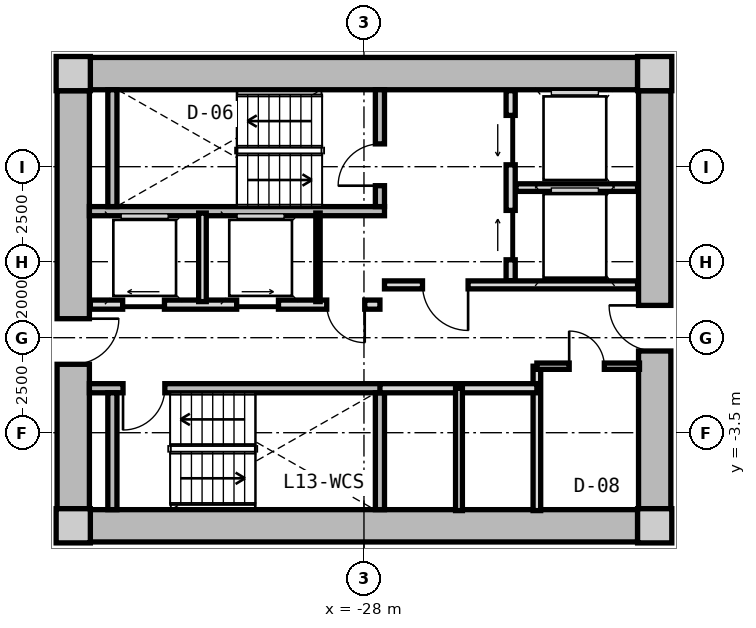
"""IFC4 building model, lengths in metres.
Left out: names, types, materials, properties, quantities, classifications, styles, units other than length and angle.
Written with IfcOpenShell. Run it as: python <this file> out.ifc"""

import sys

from ifc_helpers import new_model, si_unit, direction, frame, frame_2d, origin, origin_2d, place, context, subcontext, project, spatial, rectangle, extrude, source, transform, mapped, element, fill, save


model = new_model("IFC4")
c1 = context("Model", 3, precision=1e-05, world=origin(), true_north=direction((0.0, 1.0)))
c2 = subcontext(c1, "Body", "Model", "MODEL_VIEW")
j1 = project(units=[si_unit("LENGTHUNIT", "METRE"), si_unit("PLANEANGLEUNIT", "RADIAN")], contexts=[c1])
p1 = place(None, origin())
s1 = spatial("IfcSite", under=j1, at=p1, CompositionType="ELEMENT")
p2 = place(p1, origin())
s2 = spatial("IfcBuilding", under=s1, at=p2, CompositionType="ELEMENT")
p3 = place(p2, frame((0.0, 0.0, 46.0)))
s3 = spatial("IfcBuildingStorey", under=s2, at=p3, CompositionType="ELEMENT", Elevation=46.0)
m1 = source(origin(), c2, "Body", "SweptSolid", [
    extrude(rectangle(XDim=0.9, YDim=0.9, at=origin_2d()), origin(), (0.0, 0.0, 1.0), 3.05),
])
for number, where, z_axis, x_axis in (
    (1, (-35.65, -5.95, 0.0), (0.0, 0.0, 1.0), (1.0, 0.0, 0.0)),
    (2, (-20.35, -5.95, 0.0), (0.0, 0.0, 1.0), (1.0, 0.0, 0.0)),
    (3, (-20.35, 5.95, 0.0), (0.0, 0.0, 1.0), (1.0, 0.0, 0.0)),
    (4, (-35.65, 5.95, 0.0), (0.0, 0.0, 1.0), (1.0, 0.0, 0.0)),
):
    element("IfcColumn", number, at=place(p3, frame(where, z_axis=z_axis, x_axis=x_axis)), inside=s3, PredefinedType="COLUMN", context=c2, shape_type="MappedRepresentation", body=[
        mapped(m1, transform((0.0, 0.0, 0.0), x_axis=(1.0, 0.0, 0.0), y_axis=(0.0, 1.0, 0.0), z_axis=(0.0, 0.0, 1.0), scale=1.0)),
    ])
m2 = source(origin(), c2, "Body", "SweptSolid", [
    extrude(rectangle(XDim=14.4, YDim=0.85, at=frame_2d((7.2, 0.0))), origin(), (0.0, 0.0, 1.0), 2.79),
])
for number, where, z_axis, x_axis in (
    (5, (-35.2, 5.95, 0.0), (0.0, 0.0, 1.0), (1.0, 0.0, 0.0)),
    (6, (-20.8, -5.95, 0.0), (0.0, 0.0, 1.0), (-1.0, 0.0, 0.0)),
):
    element("IfcWall", number, at=place(p3, frame(where, z_axis=z_axis, x_axis=x_axis)), inside=s3, PredefinedType="SHEAR", context=c2, shape_type="MappedRepresentation", body=[
        mapped(m2, transform((0.0, 0.0, 0.0), x_axis=(1.0, 0.0, 0.0), y_axis=(0.0, 1.0, 0.0), z_axis=(0.0, 0.0, 1.0), scale=1.0)),
    ])
m3 = source(origin(), c2, "Body", "SweptSolid", [
    extrude(rectangle(XDim=11.0, YDim=0.85, at=frame_2d((5.5, 0.0))), origin(), (0.0, 0.0, 1.0), 2.79),
])
p4 = place(p3, frame((-35.65, -5.5, 0.0), z_axis=(0.0, 0.0, 1.0), x_axis=(0.0, 1.0, 0.0)))
e7 = element("IfcWall", 7, at=p4, inside=s3, PredefinedType="SHEAR", context=c2, shape_type="MappedRepresentation", body=[
    mapped(m3, transform((0.0, 0.0, 0.0), x_axis=(1.0, 0.0, 0.0), y_axis=(0.0, 1.0, 0.0), z_axis=(0.0, 0.0, 1.0), scale=1.0)),
])
p5 = place(p4, frame((3.8, 0.0, 0.0)))
e8 = element("IfcOpeningElement", 8, at=p5, cuts=e7, PredefinedType="OPENING", context=c2, shape_type="SweptSolid", body=[
    extrude(rectangle(XDim=1.2, YDim=2.15, at=frame_2d((0.6, 1.075))), frame((0.0, 0.435, 0.0), z_axis=(0.0, -1.0, 0.0), x_axis=(1.0, 0.0, 0.0)), (0.0, 0.0, 1.0), 0.87),
])
p6 = place(p3, frame((-20.35, 5.5, 0.0), z_axis=(0.0, 0.0, 1.0), x_axis=(0.0, -1.0, 0.0)))
e9 = element("IfcWall", 9, at=p6, inside=s3, PredefinedType="SHEAR", context=c2, shape_type="MappedRepresentation", body=[
    mapped(m3, transform((0.0, 0.0, 0.0), x_axis=(1.0, 0.0, 0.0), y_axis=(0.0, 1.0, 0.0), z_axis=(0.0, 0.0, 1.0), scale=1.0)),
])
p7 = place(p6, frame((5.65, 0.0, 0.0)))
e10 = element("IfcOpeningElement", 10, at=p7, cuts=e9, PredefinedType="OPENING", context=c2, shape_type="SweptSolid", body=[
    extrude(rectangle(XDim=1.2, YDim=2.15, at=frame_2d((0.6, 1.075))), frame((0.0, 0.435, 0.0), z_axis=(0.0, -1.0, 0.0), x_axis=(1.0, 0.0, 0.0)), (0.0, 0.0, 1.0), 0.87),
])
m4 = source(origin(), c2, "Body", "SweptSolid", [
    extrude(rectangle(XDim=7.765, YDim=0.24, at=frame_2d((3.883, 0.0))), origin(), (0.0, 0.0, 1.0), 2.79),
])
p8 = place(p3, frame((-35.225, 2.33, 0.0), z_axis=(0.0, 0.0, 1.0), x_axis=(1.0, 0.0, 0.0)))
e11 = element("IfcWall", 11, at=p8, inside=s3, PredefinedType="PARTITIONING", context=c2, shape_type="MappedRepresentation", body=[
    mapped(m4, transform((0.0, 0.0, 0.0), x_axis=(1.0, 0.0, 0.0), y_axis=(0.0, 1.0, 0.0), z_axis=(0.0, 0.0, 1.0), scale=1.0)),
])
m5 = source(origin(), c2, "Body", "SweptSolid", [
    extrude(rectangle(XDim=3.075, YDim=0.24, at=frame_2d((1.538, 0.0))), origin(), (0.0, 0.0, 1.0), 2.79),
])
p9 = place(p3, frame((-34.62, 2.45, 0.0), z_axis=(0.0, 0.0, 1.0), x_axis=(0.0, 1.0, 0.0)))
e12 = element("IfcWall", 12, at=p9, inside=s3, PredefinedType="PARTITIONING", context=c2, shape_type="MappedRepresentation", body=[
    mapped(m5, transform((0.0, 0.0, 0.0), x_axis=(1.0, 0.0, 0.0), y_axis=(0.0, 1.0, 0.0), z_axis=(0.0, 0.0, 1.0), scale=1.0)),
])
p10 = place(p3, frame((-27.58, 2.45, 0.0), z_axis=(0.0, 0.0, 1.0), x_axis=(0.0, 1.0, 0.0)))
e13 = element("IfcWall", 13, at=p10, inside=s3, PredefinedType="PARTITIONING", context=c2, shape_type="MappedRepresentation", body=[
    mapped(m5, transform((0.0, 0.0, 0.0), x_axis=(1.0, 0.0, 0.0), y_axis=(0.0, 1.0, 0.0), z_axis=(0.0, 0.0, 1.0), scale=1.0)),
])
p11 = place(p10, frame((0.55, 0.0, 0.0)))
e14 = element("IfcOpeningElement", 14, at=p11, cuts=e13, PredefinedType="OPENING", context=c2, shape_type="SweptSolid", body=[
    extrude(rectangle(XDim=1.1, YDim=2.15, at=frame_2d((0.55, 1.075))), frame((0.0, 0.13, 0.0), z_axis=(0.0, -1.0, 0.0), x_axis=(1.0, 0.0, 0.0)), (0.0, 0.0, 1.0), 0.26),
])
p12 = place(p3, frame((-35.225, -2.33, 0.0), z_axis=(0.0, 0.0, 1.0), x_axis=(1.0, 0.0, 0.0)))
e15 = element("IfcWall", 15, at=p12, inside=s3, PredefinedType="PARTITIONING", context=c2, shape_type="MappedRepresentation", body=[
    mapped(m4, transform((0.0, 0.0, 0.0), x_axis=(1.0, 0.0, 0.0), y_axis=(0.0, 1.0, 0.0), z_axis=(0.0, 0.0, 1.0), scale=1.0)),
])
p13 = place(p12, frame((0.885, 0.0, 0.0)))
e16 = element("IfcOpeningElement", 16, at=p13, cuts=e15, PredefinedType="OPENING", context=c2, shape_type="SweptSolid", body=[
    extrude(rectangle(XDim=1.1, YDim=2.15, at=frame_2d((0.55, 1.075))), frame((0.0, 0.13, 0.0), z_axis=(0.0, -1.0, 0.0), x_axis=(1.0, 0.0, 0.0)), (0.0, 0.0, 1.0), 0.26),
])
for number, where, z_axis, x_axis in (
    (17, (-34.62, -5.525, 0.0), (0.0, 0.0, 1.0), (0.0, 1.0, 0.0)),
    (18, (-27.58, -5.525, 0.0), (0.0, 0.0, 1.0), (0.0, 1.0, 0.0)),
):
    element("IfcWall", number, at=place(p3, frame(where, z_axis=z_axis, x_axis=x_axis)), inside=s3, PredefinedType="PARTITIONING", context=c2, shape_type="MappedRepresentation", body=[
        mapped(m5, transform((0.0, 0.0, 0.0), x_axis=(1.0, 0.0, 0.0), y_axis=(0.0, 1.0, 0.0), z_axis=(0.0, 0.0, 1.0), scale=1.0)),
    ])
m6 = source(origin(), c2, "Body", "SweptSolid", [
    extrude(rectangle(XDim=5.0, YDim=0.24, at=frame_2d((2.5, 0.0))), origin(), (0.0, 0.0, 1.0), 2.775),
])
p14 = place(p3, frame((-24.14, 0.5, 0.0), z_axis=(0.0, 0.0, 1.0), x_axis=(0.0, 1.0, 0.0)))
e19 = element("IfcWall", 19, at=p14, inside=s3, PredefinedType="PARTITIONING", context=c2, shape_type="MappedRepresentation", body=[
    mapped(m6, transform((0.0, 0.0, 0.0), x_axis=(1.0, 0.0, 0.0), y_axis=(0.0, 1.0, 0.0), z_axis=(0.0, 0.0, 1.0), scale=1.0)),
])
p15 = place(p14, frame((3.05, 0.0, 0.0)))
e20 = element("IfcOpeningElement", 20, at=p15, cuts=e19, PredefinedType="OPENING", context=c2, shape_type="SweptSolid", body=[
    extrude(rectangle(XDim=1.3, YDim=2.2, at=frame_2d((0.65, 1.1))), frame((0.0, 0.13, 0.0), z_axis=(0.0, -1.0, 0.0), x_axis=(1.0, 0.0, 0.0)), (0.0, 0.0, 1.0), 0.26),
])
p16 = place(p14, frame((0.55, 0.0, 0.0)))
e21 = element("IfcOpeningElement", 21, at=p16, cuts=e19, PredefinedType="OPENING", context=c2, shape_type="SweptSolid", body=[
    extrude(rectangle(XDim=1.3, YDim=2.2, at=frame_2d((0.65, 1.1))), frame((0.0, 0.13, 0.0), z_axis=(0.0, -1.0, 0.0), x_axis=(1.0, 0.0, 0.0)), (0.0, 0.0, 1.0), 0.26),
])
m7 = source(origin(), c2, "Body", "SweptSolid", [
    extrude(rectangle(XDim=3.2, YDim=0.2, at=frame_2d((1.6, 0.0))), origin(), (0.0, 0.0, 1.0), 2.775),
])
p17 = place(p3, frame((-24.0, 2.95, 0.0), z_axis=(0.0, 0.0, 1.0), x_axis=(1.0, 0.0, 0.0)))
e22 = element("IfcWall", 22, at=p17, inside=s3, PredefinedType="PARTITIONING", context=c2, shape_type="MappedRepresentation", body=[
    mapped(m7, transform((0.0, 0.0, 0.0), x_axis=(1.0, 0.0, 0.0), y_axis=(0.0, 1.0, 0.0), z_axis=(0.0, 0.0, 1.0), scale=1.0)),
])
m8 = source(origin(), c2, "Body", "SweptSolid", [
    extrude(rectangle(XDim=6.66, YDim=0.21, at=frame_2d((3.33, 0.0))), origin(), (0.0, 0.0, 1.0), 2.775),
])
p18 = place(p3, frame((-27.46, 0.39, 0.0), z_axis=(0.0, 0.0, 1.0), x_axis=(1.0, 0.0, 0.0)))
e23 = element("IfcWall", 23, at=p18, inside=s3, PredefinedType="PARTITIONING", context=c2, shape_type="MappedRepresentation", body=[
    mapped(m8, transform((0.0, 0.0, 0.0), x_axis=(1.0, 0.0, 0.0), y_axis=(0.0, 1.0, 0.0), z_axis=(0.0, 0.0, 1.0), scale=1.0)),
])
p19 = place(p18, frame((1.0, 0.0, 0.0)))
e24 = element("IfcOpeningElement", 24, at=p19, cuts=e23, PredefinedType="OPENING", context=c2, shape_type="SweptSolid", body=[
    extrude(rectangle(XDim=1.2, YDim=2.15, at=frame_2d((0.6, 1.075))), frame((0.0, 0.115, 0.0), z_axis=(0.0, -1.0, 0.0), x_axis=(1.0, 0.0, 0.0)), (0.0, 0.0, 1.0), 0.23),
])
m9 = source(origin(), c2, "Body", "SweptSolid", [
    extrude(rectangle(XDim=7.62, YDim=0.24, at=frame_2d((3.81, 0.0))), origin(), (0.0, 0.0, 1.0), 2.775),
])
p20 = place(p3, frame((-35.2, -0.13, 0.0), z_axis=(0.0, 0.0, 1.0), x_axis=(1.0, 0.0, 0.0)))
e25 = element("IfcWall", 25, at=p20, inside=s3, PredefinedType="PARTITIONING", context=c2, shape_type="MappedRepresentation", body=[
    mapped(m9, transform((0.0, 0.0, 0.0), x_axis=(1.0, 0.0, 0.0), y_axis=(0.0, 1.0, 0.0), z_axis=(0.0, 0.0, 1.0), scale=1.0)),
])
p21 = place(p20, frame((6.22, 0.0, 0.0)))
e26 = element("IfcOpeningElement", 26, at=p21, cuts=e25, PredefinedType="OPENING", context=c2, shape_type="SweptSolid", body=[
    extrude(rectangle(XDim=1.0, YDim=2.1, at=frame_2d((0.5, 1.05))), frame((0.0, 0.13, 0.0), z_axis=(0.0, -1.0, 0.0), x_axis=(1.0, 0.0, 0.0)), (0.0, 0.0, 1.0), 0.26),
])
p22 = place(p20, frame((0.85, 0.0, 0.0)))
e27 = element("IfcOpeningElement", 27, at=p22, cuts=e25, PredefinedType="OPENING", context=c2, shape_type="SweptSolid", body=[
    extrude(rectangle(XDim=1.1, YDim=2.2, at=frame_2d((0.55, 1.1))), frame((0.0, 0.13, 0.0), z_axis=(0.0, -1.0, 0.0), x_axis=(1.0, 0.0, 0.0)), (0.0, 0.0, 1.0), 0.26),
])
p23 = place(p20, frame((3.85, 0.0, 0.0)))
e28 = element("IfcOpeningElement", 28, at=p23, cuts=e25, PredefinedType="OPENING", context=c2, shape_type="SweptSolid", body=[
    extrude(rectangle(XDim=1.1, YDim=2.2, at=frame_2d((0.55, 1.1))), frame((0.0, 0.13, 0.0), z_axis=(0.0, -1.0, 0.0), x_axis=(1.0, 0.0, 0.0)), (0.0, 0.0, 1.0), 0.26),
])
m10 = source(origin(), c2, "Body", "SweptSolid", [
    extrude(rectangle(XDim=2.33, YDim=0.115, at=frame_2d((1.165, 0.0))), origin(), (0.0, 0.0, 1.0), 2.775),
])
p24 = place(p3, frame((-29.21, -0.05, 0.0), z_axis=(0.0, 0.0, 1.0), x_axis=(0.0, 1.0, 0.0)))
e29 = element("IfcWall", 29, at=p24, inside=s3, PredefinedType="PARTITIONING", context=c2, shape_type="MappedRepresentation", body=[
    mapped(m10, transform((0.0, 0.0, 0.0), x_axis=(1.0, 0.0, 0.0), y_axis=(0.0, 1.0, 0.0), z_axis=(0.0, 0.0, 1.0), scale=1.0)),
])
m11 = source(origin(), c2, "Body", "SweptSolid", [
    extrude(rectangle(XDim=2.33, YDim=0.2, at=frame_2d((1.165, 0.0))), origin(), (0.0, 0.0, 1.0), 2.775),
])
p25 = place(p3, frame((-32.25, -0.05, 0.0), z_axis=(0.0, 0.0, 1.0), x_axis=(0.0, 1.0, 0.0)))
e30 = element("IfcWall", 30, at=p25, inside=s3, PredefinedType="PARTITIONING", context=c2, shape_type="MappedRepresentation", body=[
    mapped(m11, transform((0.0, 0.0, 0.0), x_axis=(1.0, 0.0, 0.0), y_axis=(0.0, 1.0, 0.0), z_axis=(0.0, 0.0, 1.0), scale=1.0)),
])
m12 = source(origin(), c2, "Body", "SweptSolid", [
    extrude(rectangle(XDim=3.8, YDim=0.2, at=frame_2d((1.9, 0.0))), origin(), (0.0, 0.0, 1.0), 2.775),
])
p26 = place(p3, frame((-23.45, -5.55, 0.0), z_axis=(0.0, 0.0, 1.0), x_axis=(0.0, 1.0, 0.0)))
e31 = element("IfcWall", 31, at=p26, inside=s3, PredefinedType="PARTITIONING", context=c2, shape_type="MappedRepresentation", body=[
    mapped(m12, transform((0.0, 0.0, 0.0), x_axis=(1.0, 0.0, 0.0), y_axis=(0.0, 1.0, 0.0), z_axis=(0.0, 0.0, 1.0), scale=1.0)),
])
m13 = source(origin(), c2, "Body", "SweptSolid", [
    extrude(rectangle(XDim=4.13, YDim=0.24, at=frame_2d((2.065, 0.0))), origin(), (0.0, 0.0, 1.0), 2.775),
])
p27 = place(p3, frame((-27.58, -2.33, 0.0), z_axis=(0.0, 0.0, 1.0), x_axis=(1.0, 0.0, 0.0)))
e32 = element("IfcWall", 32, at=p27, inside=s3, PredefinedType="PARTITIONING", context=c2, shape_type="MappedRepresentation", body=[
    mapped(m13, transform((0.0, 0.0, 0.0), x_axis=(1.0, 0.0, 0.0), y_axis=(0.0, 1.0, 0.0), z_axis=(0.0, 0.0, 1.0), scale=1.0)),
])
m14 = source(origin(), c2, "Body", "SweptSolid", [
    extrude(rectangle(XDim=3.22, YDim=0.18, at=frame_2d((1.61, 0.0))), origin(), (0.0, 0.0, 1.0), 2.775),
])
p28 = place(p3, frame((-25.5, -5.55, 0.0), z_axis=(0.0, 0.0, 1.0), x_axis=(0.0, 1.0, 0.0)))
e33 = element("IfcWall", 33, at=p28, inside=s3, PredefinedType="PARTITIONING", context=c2, shape_type="MappedRepresentation", body=[
    mapped(m14, transform((0.0, 0.0, 0.0), x_axis=(1.0, 0.0, 0.0), y_axis=(0.0, 1.0, 0.0), z_axis=(0.0, 0.0, 1.0), scale=1.0)),
])
m15 = source(origin(), c2, "Body", "SweptSolid", [
    extrude(rectangle(XDim=2.7, YDim=0.165, at=frame_2d((1.35, 0.0))), origin(), (0.0, 0.0, 1.0), 2.775),
])
p29 = place(p3, frame((-23.45, -1.75, 0.0), z_axis=(0.0, 0.0, 1.0), x_axis=(1.0, 0.0, 0.0)))
e34 = element("IfcWall", 34, at=p29, inside=s3, PredefinedType="PARTITIONING", context=c2, shape_type="MappedRepresentation", body=[
    mapped(m15, transform((0.0, 0.0, 0.0), x_axis=(1.0, 0.0, 0.0), y_axis=(0.0, 1.0, 0.0), z_axis=(0.0, 0.0, 1.0), scale=1.0)),
])
p30 = place(p29, frame((0.85, 0.0, 0.0)))
e35 = element("IfcOpeningElement", 35, at=p30, cuts=e34, PredefinedType="OPENING", context=c2, shape_type="SweptSolid", body=[
    extrude(rectangle(XDim=0.925, YDim=2.1, at=frame_2d((0.462, 1.05))), frame((0.0, 0.093, 0.0), z_axis=(0.0, -1.0, 0.0), x_axis=(1.0, 0.0, 0.0)), (0.0, 0.0, 1.0), 0.185),
])
m16 = source(origin(), c2, "Body", "SweptSolid", [
    extrude(rectangle(XDim=1.1, YDim=2.15, at=frame_2d((0.55, 1.075))), frame((0.0, 0.025, 0.0), z_axis=(0.0, -1.0, 0.0), x_axis=(1.0, 0.0, 0.0)), (0.0, 0.0, 1.0), 0.05),
])
p31 = place(p11, origin())
e36 = element("IfcDoor", 36, at=p31, inside=s3, OperationType="SINGLE_SWING_LEFT", PredefinedType="DOOR", context=c2, shape_type="MappedRepresentation", body=[
    mapped(m16, transform((0.0, 0.0, 0.0), x_axis=(1.0, 0.0, 0.0), y_axis=(0.0, 1.0, 0.0), z_axis=(0.0, 0.0, 1.0), scale=1.0)),
])
fill(e14, e36)
p32 = place(p13, frame((1.1, 0.0, 0.0), z_axis=(0.0, 0.0, 1.0), x_axis=(-1.0, 0.0, 0.0)))
e37 = element("IfcDoor", 37, at=p32, inside=s3, OperationType="SINGLE_SWING_RIGHT", PredefinedType="DOOR", context=c2, shape_type="MappedRepresentation", body=[
    mapped(m16, transform((0.0, 0.0, 0.0), x_axis=(1.0, 0.0, 0.0), y_axis=(0.0, 1.0, 0.0), z_axis=(0.0, 0.0, 1.0), scale=1.0)),
])
fill(e16, e37)
m17 = source(origin(), c2, "Body", "SweptSolid", [
    extrude(rectangle(XDim=1.3, YDim=2.2, at=frame_2d((0.65, 1.1))), frame((0.0, 0.025, 0.0), z_axis=(0.0, -1.0, 0.0), x_axis=(1.0, 0.0, 0.0)), (0.0, 0.0, 1.0), 0.05),
])
p33 = place(p15, origin())
e38 = element("IfcDoor", 38, at=p33, inside=s3, OperationType="SLIDING_TO_LEFT", PredefinedType="DOOR", context=c2, shape_type="MappedRepresentation", body=[
    mapped(m17, transform((0.0, 0.0, 0.0), x_axis=(1.0, 0.0, 0.0), y_axis=(0.0, 1.0, 0.0), z_axis=(0.0, 0.0, 1.0), scale=1.0)),
])
fill(e20, e38)
p34 = place(p16, origin())
e39 = element("IfcDoor", 39, at=p34, inside=s3, OperationType="SLIDING_TO_RIGHT", PredefinedType="DOOR", context=c2, shape_type="MappedRepresentation", body=[
    mapped(m17, transform((0.0, 0.0, 0.0), x_axis=(1.0, 0.0, 0.0), y_axis=(0.0, 1.0, 0.0), z_axis=(0.0, 0.0, 1.0), scale=1.0)),
])
fill(e21, e39)
m18 = source(origin(), c2, "Body", "SweptSolid", [
    extrude(rectangle(XDim=1.2, YDim=2.15, at=frame_2d((0.6, 1.075))), frame((0.0, 0.025, 0.0), z_axis=(0.0, -1.0, 0.0), x_axis=(1.0, 0.0, 0.0)), (0.0, 0.0, 1.0), 0.05),
])
p35 = place(p19, frame((1.2, 0.0, 0.0), z_axis=(0.0, 0.0, 1.0), x_axis=(-1.0, 0.0, 0.0)))
e40 = element("IfcDoor", 40, at=p35, inside=s3, OperationType="SINGLE_SWING_LEFT", PredefinedType="DOOR", context=c2, shape_type="MappedRepresentation", body=[
    mapped(m18, transform((0.0, 0.0, 0.0), x_axis=(1.0, 0.0, 0.0), y_axis=(0.0, 1.0, 0.0), z_axis=(0.0, 0.0, 1.0), scale=1.0)),
])
fill(e24, e40)
p36 = place(p5, frame((1.2, 0.0, 0.0), z_axis=(0.0, 0.0, 1.0), x_axis=(-1.0, 0.0, 0.0)))
e41 = element("IfcDoor", 41, at=p36, inside=s3, OperationType="SINGLE_SWING_LEFT", PredefinedType="DOOR", context=c2, shape_type="MappedRepresentation", body=[
    mapped(m18, transform((0.0, 0.0, 0.0), x_axis=(1.0, 0.0, 0.0), y_axis=(0.0, 1.0, 0.0), z_axis=(0.0, 0.0, 1.0), scale=1.0)),
])
fill(e8, e41)
p37 = place(p7, frame((1.2, 0.0, 0.0), z_axis=(0.0, 0.0, 1.0), x_axis=(-1.0, 0.0, 0.0)))
e42 = element("IfcDoor", 42, at=p37, inside=s3, OperationType="SINGLE_SWING_RIGHT", PredefinedType="DOOR", context=c2, shape_type="MappedRepresentation", body=[
    mapped(m18, transform((0.0, 0.0, 0.0), x_axis=(1.0, 0.0, 0.0), y_axis=(0.0, 1.0, 0.0), z_axis=(0.0, 0.0, 1.0), scale=1.0)),
])
fill(e10, e42)
m19 = source(origin(), c2, "Body", "SweptSolid", [
    extrude(rectangle(XDim=1.0, YDim=2.1, at=frame_2d((0.5, 1.05))), frame((0.0, 0.025, 0.0), z_axis=(0.0, -1.0, 0.0), x_axis=(1.0, 0.0, 0.0)), (0.0, 0.0, 1.0), 0.05),
])
p38 = place(p21, frame((1.0, 0.0, 0.0), z_axis=(0.0, 0.0, 1.0), x_axis=(-1.0, 0.0, 0.0)))
e43 = element("IfcDoor", 43, at=p38, inside=s3, OperationType="SINGLE_SWING_LEFT", PredefinedType="DOOR", context=c2, shape_type="MappedRepresentation", body=[
    mapped(m19, transform((0.0, 0.0, 0.0), x_axis=(1.0, 0.0, 0.0), y_axis=(0.0, 1.0, 0.0), z_axis=(0.0, 0.0, 1.0), scale=1.0)),
])
fill(e26, e43)
m20 = source(origin(), c2, "Body", "SweptSolid", [
    extrude(rectangle(XDim=1.1, YDim=2.2, at=frame_2d((0.55, 1.1))), frame((0.0, 0.025, 0.0), z_axis=(0.0, -1.0, 0.0), x_axis=(1.0, 0.0, 0.0)), (0.0, 0.0, 1.0), 0.05),
])
p39 = place(p22, origin())
e44 = element("IfcDoor", 44, at=p39, inside=s3, OperationType="SLIDING_TO_LEFT", PredefinedType="DOOR", context=c2, shape_type="MappedRepresentation", body=[
    mapped(m20, transform((0.0, 0.0, 0.0), x_axis=(1.0, 0.0, 0.0), y_axis=(0.0, 1.0, 0.0), z_axis=(0.0, 0.0, 1.0), scale=1.0)),
])
fill(e27, e44)
p40 = place(p23, origin())
e45 = element("IfcDoor", 45, at=p40, inside=s3, OperationType="SLIDING_TO_RIGHT", PredefinedType="DOOR", context=c2, shape_type="MappedRepresentation", body=[
    mapped(m20, transform((0.0, 0.0, 0.0), x_axis=(1.0, 0.0, 0.0), y_axis=(0.0, 1.0, 0.0), z_axis=(0.0, 0.0, 1.0), scale=1.0)),
])
fill(e28, e45)
m21 = source(origin(), c2, "Body", "SweptSolid", [
    extrude(rectangle(XDim=0.925, YDim=2.1, at=frame_2d((0.462, 1.05))), frame((0.0, 0.025, 0.0), z_axis=(0.0, -1.0, 0.0), x_axis=(1.0, 0.0, 0.0)), (0.0, 0.0, 1.0), 0.05),
])
p41 = place(p30, origin())
e46 = element("IfcDoor", 46, at=p41, inside=s3, OperationType="SINGLE_SWING_LEFT", PredefinedType="DOOR", context=c2, shape_type="MappedRepresentation", body=[
    mapped(m21, transform((0.0, 0.0, 0.0), x_axis=(1.0, 0.0, 0.0), y_axis=(0.0, 1.0, 0.0), z_axis=(0.0, 0.0, 1.0), scale=1.0)),
])
fill(e35, e46)
save(model, sys.argv[1])
